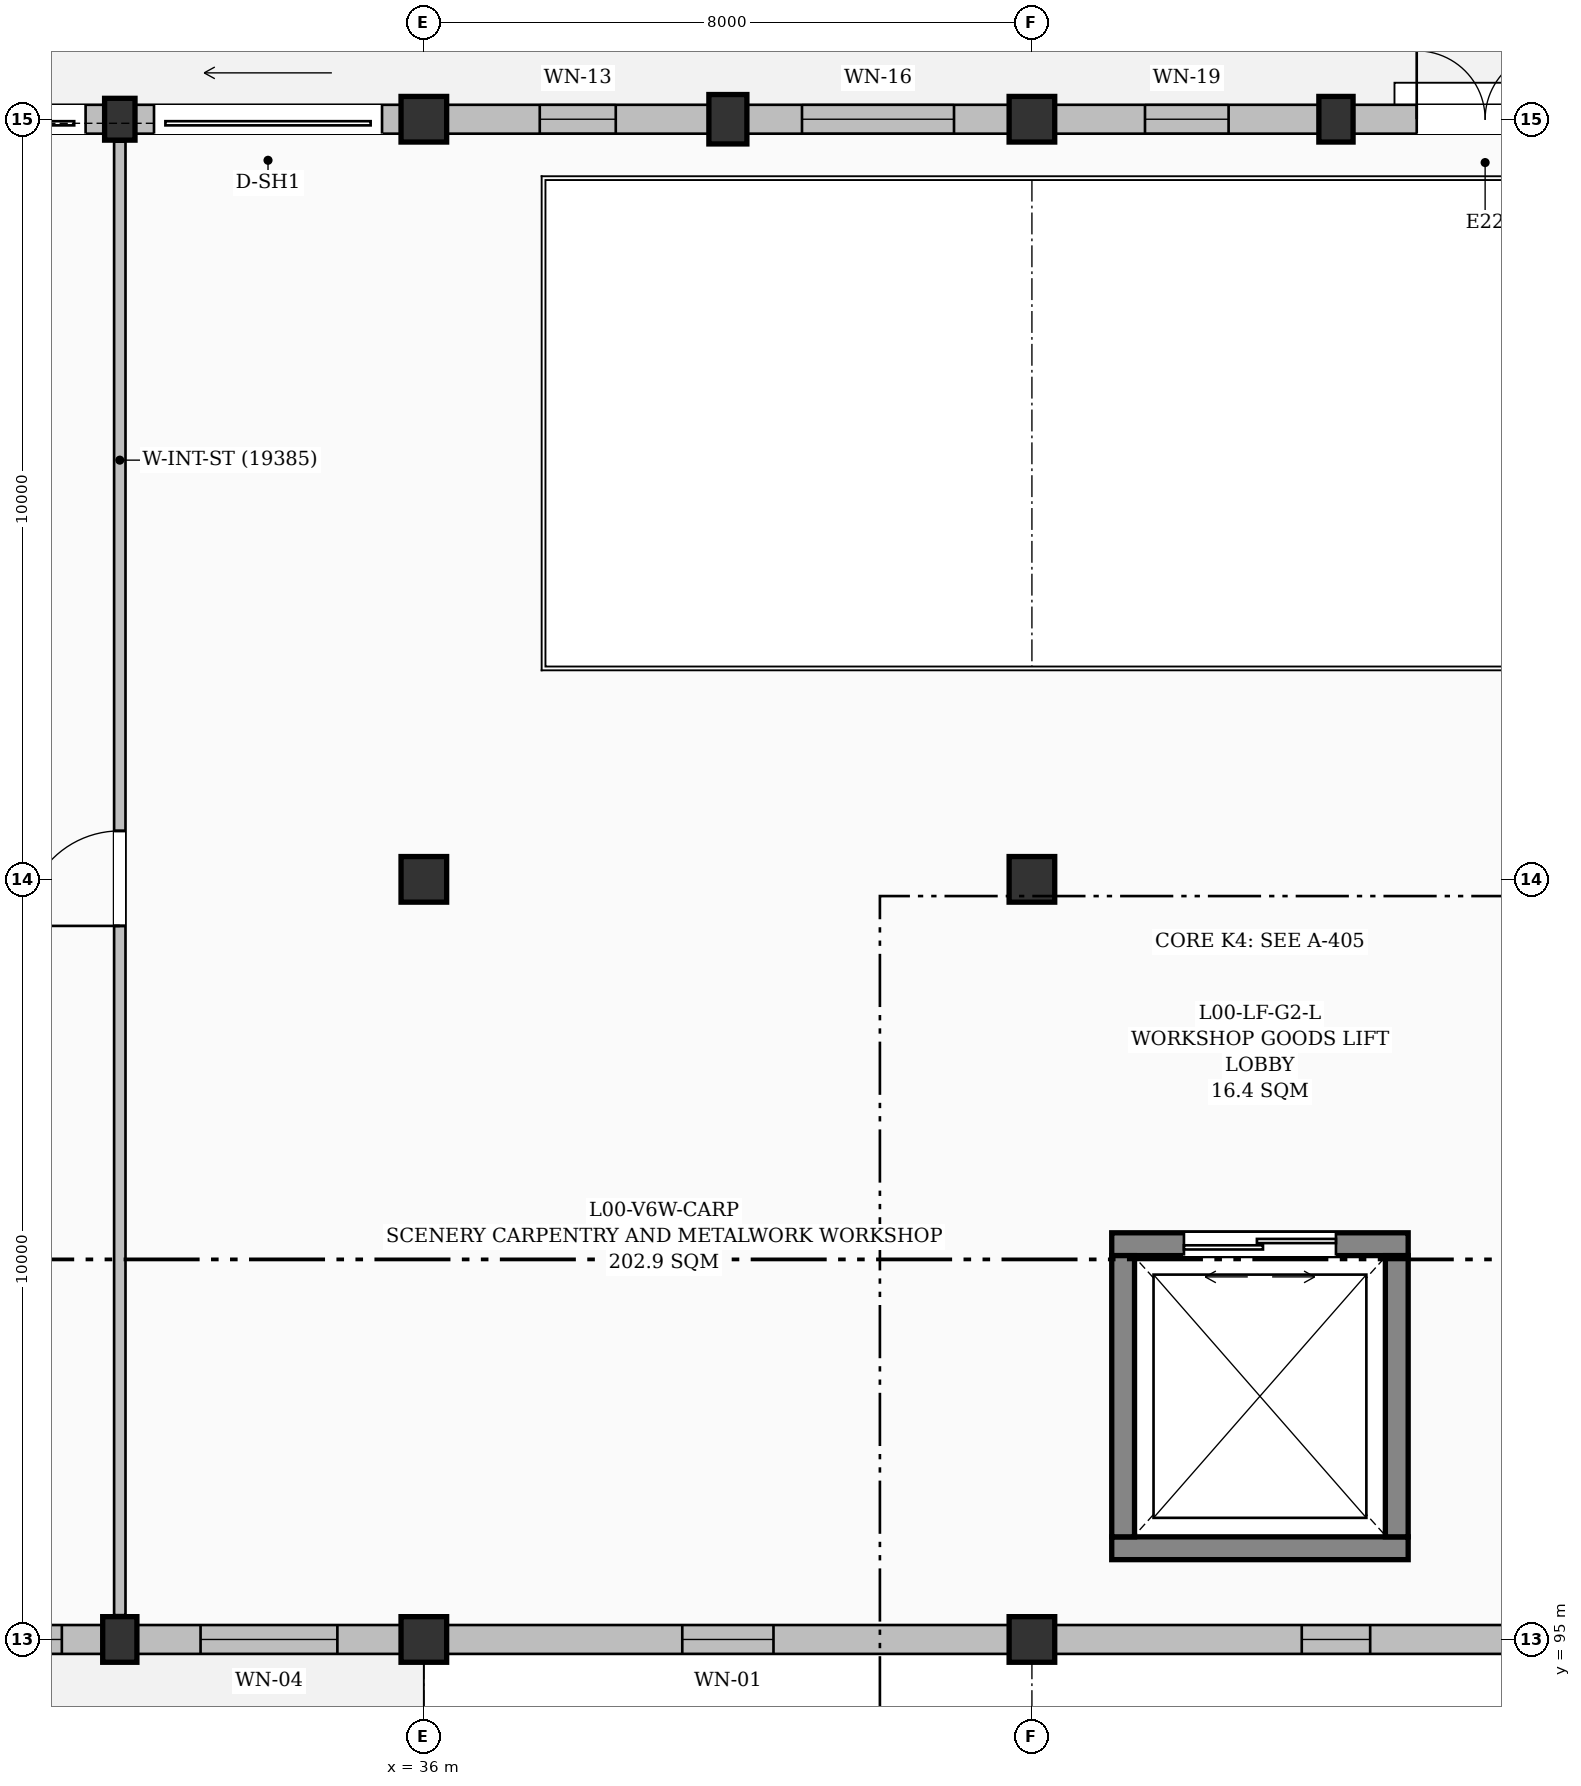
"""IFC4 building model, lengths in metres.
Left out: names, types, materials, properties, quantities, classifications, styles, units other than length and angle.
Written with IfcOpenShell. Run it as: python <this file> out.ifc"""

import sys

from ifc_helpers import new_model, si_unit, direction, frame, frame_2d, origin, origin_2d, place, context, subcontext, project, spatial, rectangle, extrude, element, fill, save


model = new_model("IFC4")
c1 = context("Model", 3, precision=1e-05, world=origin(), true_north=direction((0.0, 1.0)))
c2 = subcontext(c1, "Body", "Model", "MODEL_VIEW")
j1 = project(units=[si_unit("LENGTHUNIT", "METRE"), si_unit("PLANEANGLEUNIT", "RADIAN")], contexts=[c1])
p1 = place(None, origin())
s1 = spatial("IfcSite", under=j1, at=p1, CompositionType="ELEMENT")
p2 = place(p1, origin())
s2 = spatial("IfcBuilding", under=s1, at=p2, CompositionType="ELEMENT")
p3 = place(p2, origin())
s3 = spatial("IfcBuildingStorey", under=s2, at=p3, CompositionType="ELEMENT", Elevation=0.0)
p4 = place(p3, frame((32.0, 95.0, 0.0), z_axis=(0.0, 0.0, 1.0), x_axis=(1.0, 0.0, 0.0)))
e1 = element("IfcColumn", 1, at=p4, inside=s3, PredefinedType="PILASTER", context=c2, shape_type="SweptSolid", body=[
    extrude(rectangle(XDim=0.45, YDim=0.6, at=origin_2d()), origin(), (0.0, 0.0, 1.0), 4.8),
])
p5 = place(p3, frame((32.0, 115.0, 0.0), z_axis=(0.0, 0.0, 1.0), x_axis=(1.0, 0.0, 0.0)))
e2 = element("IfcColumn", 2, at=p5, inside=s3, PredefinedType="PILASTER", context=c2, shape_type="SweptSolid", body=[
    extrude(rectangle(XDim=0.4, YDim=0.55, at=origin_2d()), origin(), (0.0, 0.0, 1.0), 4.8),
])
for number, where, z_axis, x_axis in (
    (3, (36.0, 95.0, 0.0), (0.0, 0.0, 1.0), (1.0, 0.0, 0.0)),
    (4, (36.0, 105.0, 0.0), (0.0, 0.0, 1.0), (1.0, 0.0, 0.0)),
    (5, (36.0, 115.0, 0.0), (0.0, 0.0, 1.0), (1.0, 0.0, 0.0)),
):
    element("IfcColumn", number, at=place(p3, frame(where, z_axis=z_axis, x_axis=x_axis)), inside=s3, PredefinedType="COLUMN", context=c2, shape_type="SweptSolid", body=[
        extrude(rectangle(XDim=0.6, YDim=0.6, at=origin_2d()), origin(), (0.0, 0.0, 1.0), 4.8),
    ])
p6 = place(p3, frame((40.0, 115.0, 0.0), z_axis=(0.0, 0.0, 1.0), x_axis=(1.0, 0.0, 0.0)))
e6 = element("IfcColumn", 6, at=p6, inside=s3, PredefinedType="PILASTER", context=c2, shape_type="SweptSolid", body=[
    extrude(rectangle(XDim=0.5, YDim=0.65, at=origin_2d()), origin(), (0.0, 0.0, 1.0), 4.8),
])
for number, where, z_axis, x_axis in (
    (7, (44.0, 95.0, 0.0), (0.0, 0.0, 1.0), (1.0, 0.0, 0.0)),
    (8, (44.0, 105.0, 0.0), (0.0, 0.0, 1.0), (1.0, 0.0, 0.0)),
    (9, (44.0, 115.0, 0.0), (0.0, 0.0, 1.0), (1.0, 0.0, 0.0)),
):
    element("IfcColumn", number, at=place(p3, frame(where, z_axis=z_axis, x_axis=x_axis)), inside=s3, PredefinedType="COLUMN", context=c2, shape_type="SweptSolid", body=[
        extrude(rectangle(XDim=0.6, YDim=0.6, at=origin_2d()), origin(), (0.0, 0.0, 1.0), 4.8),
    ])
p7 = place(p3, frame((48.0, 115.0, 0.0), z_axis=(0.0, 0.0, 1.0), x_axis=(1.0, 0.0, 0.0)))
e10 = element("IfcColumn", 10, at=p7, inside=s3, PredefinedType="PILASTER", context=c2, shape_type="SweptSolid", body=[
    extrude(rectangle(XDim=0.45, YDim=0.6, at=origin_2d()), origin(), (0.0, 0.0, 1.0), 4.8),
])
p8 = place(p3, frame((28.3, 115.0, 0.0), z_axis=(0.0, 0.0, 1.0), x_axis=(1.0, 0.0, 0.0)))
e11 = element("IfcWall", 11, at=p8, inside=s3, PredefinedType="SOLIDWALL", context=c2, shape_type="SweptSolid", body=[
    extrude(rectangle(XDim=3.5, YDim=0.38, at=frame_2d((1.75, 0.0))), origin(), (0.0, 0.0, 1.0), 3.985),
])
p9 = place(p8, frame((0.25, 0.0, 0.0)))
e12 = element("IfcOpeningElement", 12, at=p9, cuts=e11, PredefinedType="OPENING", context=c2, shape_type="SweptSolid", body=[
    extrude(rectangle(XDim=3.0, YDim=3.1, at=frame_2d((1.5, 1.55))), frame((0.0, 0.2, 0.0), z_axis=(0.0, -1.0, 0.0), x_axis=(1.0, 0.0, 0.0)), (0.0, 0.0, 1.0), 0.4),
])
p10 = place(p3, frame((32.2, 115.0, 0.0), z_axis=(0.0, 0.0, 1.0), x_axis=(1.0, 0.0, 0.0)))
e13 = element("IfcWall", 13, at=p10, inside=s3, PredefinedType="SOLIDWALL", context=c2, shape_type="SweptSolid", body=[
    extrude(rectangle(XDim=3.5, YDim=0.38, at=frame_2d((1.75, 0.0))), origin(), (0.0, 0.0, 1.0), 3.985),
])
p11 = place(p10, frame((0.25, 0.0, 0.0)))
e14 = element("IfcOpeningElement", 14, at=p11, cuts=e13, PredefinedType="OPENING", context=c2, shape_type="SweptSolid", body=[
    extrude(rectangle(XDim=3.0, YDim=3.1, at=frame_2d((1.5, 1.55))), frame((0.0, 0.2, 0.0), z_axis=(0.0, -1.0, 0.0), x_axis=(1.0, 0.0, 0.0)), (0.0, 0.0, 1.0), 0.4),
])
p12 = place(p3, frame((36.3, 115.0, 0.0), z_axis=(0.0, 0.0, 1.0), x_axis=(1.0, 0.0, 0.0)))
e15 = element("IfcWall", 15, at=p12, inside=s3, PredefinedType="SOLIDWALL", context=c2, shape_type="SweptSolid", body=[
    extrude(rectangle(XDim=3.45, YDim=0.38, at=frame_2d((1.725, 0.0))), origin(), (0.0, 0.0, 1.0), 3.935),
])
p13 = place(p12, frame((1.225, 0.0, 0.95)))
e16 = element("IfcOpeningElement", 16, at=p13, cuts=e15, PredefinedType="OPENING", context=c2, shape_type="SweptSolid", body=[
    extrude(rectangle(XDim=1.0, YDim=1.4, at=frame_2d((0.5, 0.7))), frame((0.0, 0.2, 0.0), z_axis=(0.0, -1.0, 0.0), x_axis=(1.0, 0.0, 0.0)), (0.0, 0.0, 1.0), 0.4),
])
p14 = place(p3, frame((40.25, 115.0, 0.0), z_axis=(0.0, 0.0, 1.0), x_axis=(1.0, 0.0, 0.0)))
e17 = element("IfcWall", 17, at=p14, inside=s3, PredefinedType="SOLIDWALL", context=c2, shape_type="SweptSolid", body=[
    extrude(rectangle(XDim=3.45, YDim=0.38, at=frame_2d((1.725, 0.0))), origin(), (0.0, 0.0, 1.0), 3.935),
])
p15 = place(p14, frame((0.725, 0.0, 0.95)))
e18 = element("IfcOpeningElement", 18, at=p15, cuts=e17, PredefinedType="OPENING", context=c2, shape_type="SweptSolid", body=[
    extrude(rectangle(XDim=2.0, YDim=1.2, at=frame_2d((1.0, 0.6))), frame((0.0, 0.2, 0.0), z_axis=(0.0, -1.0, 0.0), x_axis=(1.0, 0.0, 0.0)), (0.0, 0.0, 1.0), 0.4),
])
p16 = place(p3, frame((44.3, 115.0, 0.0), z_axis=(0.0, 0.0, 1.0), x_axis=(1.0, 0.0, 0.0)))
e19 = element("IfcWall", 19, at=p16, inside=s3, PredefinedType="SOLIDWALL", context=c2, shape_type="SweptSolid", body=[
    extrude(rectangle(XDim=3.475, YDim=0.38, at=frame_2d((1.737, 0.0))), origin(), (0.0, 0.0, 1.0), 4.235),
])
p17 = place(p16, frame((1.188, 0.0, 0.95)))
e20 = element("IfcOpeningElement", 20, at=p17, cuts=e19, PredefinedType="OPENING", context=c2, shape_type="SweptSolid", body=[
    extrude(rectangle(XDim=1.1, YDim=2.0, at=frame_2d((0.55, 1.0))), frame((0.0, 0.2, 0.0), z_axis=(0.0, -1.0, 0.0), x_axis=(1.0, 0.0, 0.0)), (0.0, 0.0, 1.0), 0.4),
])
p18 = place(p3, frame((48.225, 115.0, 0.0), z_axis=(0.0, 0.0, 1.0), x_axis=(1.0, 0.0, 0.0)))
e21 = element("IfcWall", 21, at=p18, inside=s3, PredefinedType="SOLIDWALL", context=c2, shape_type="SweptSolid", body=[
    extrude(rectangle(XDim=3.475, YDim=0.38, at=frame_2d((1.737, 0.0))), origin(), (0.0, 0.0, 1.0), 4.235),
])
p19 = place(p18, frame((0.837, 0.0, 0.0)))
e22 = element("IfcOpeningElement", 22, at=p19, cuts=e21, PredefinedType="OPENING", context=c2, shape_type="SweptSolid", body=[
    extrude(rectangle(XDim=1.8, YDim=2.25, at=frame_2d((0.9, 1.125))), frame((0.0, 0.2, 0.0), z_axis=(0.0, -1.0, 0.0), x_axis=(1.0, 0.0, 0.0)), (0.0, 0.0, 1.0), 0.4),
])
p20 = place(p3, frame((51.7, 95.0, 0.0), z_axis=(0.0, 0.0, 1.0), x_axis=(-1.0, 0.0, 0.0)))
e23 = element("IfcWall", 23, at=p20, inside=s3, PredefinedType="SOLIDWALL", context=c2, shape_type="SweptSolid", body=[
    extrude(rectangle(XDim=7.4, YDim=0.38, at=frame_2d((3.7, 0.0))), origin(), (0.0, 0.0, 1.0), 3.985),
])
p21 = place(p20, frame((3.25, 0.0, 0.95)))
e24 = element("IfcOpeningElement", 24, at=p21, cuts=e23, PredefinedType="OPENING", context=c2, shape_type="SweptSolid", body=[
    extrude(rectangle(XDim=0.9, YDim=1.8, at=frame_2d((0.45, 0.9))), frame((0.0, 0.2, 0.0), z_axis=(0.0, -1.0, 0.0), x_axis=(1.0, 0.0, 0.0)), (0.0, 0.0, 1.0), 0.4),
])
p22 = place(p3, frame((43.7, 95.0, 0.0), z_axis=(0.0, 0.0, 1.0), x_axis=(-1.0, 0.0, 0.0)))
e25 = element("IfcWall", 25, at=p22, inside=s3, PredefinedType="SOLIDWALL", context=c2, shape_type="SweptSolid", body=[
    extrude(rectangle(XDim=7.4, YDim=0.38, at=frame_2d((3.7, 0.0))), origin(), (0.0, 0.0, 1.0), 4.035),
])
p23 = place(p22, frame((3.1, 0.0, 0.95)))
e26 = element("IfcOpeningElement", 26, at=p23, cuts=e25, PredefinedType="OPENING", context=c2, shape_type="SweptSolid", body=[
    extrude(rectangle(XDim=1.2, YDim=1.8, at=frame_2d((0.6, 0.9))), frame((0.0, 0.2, 0.0), z_axis=(0.0, -1.0, 0.0), x_axis=(1.0, 0.0, 0.0)), (0.0, 0.0, 1.0), 0.4),
])
p24 = place(p3, frame((35.7, 95.0, 0.0), z_axis=(0.0, 0.0, 1.0), x_axis=(-1.0, 0.0, 0.0)))
e27 = element("IfcWall", 27, at=p24, inside=s3, PredefinedType="SOLIDWALL", context=c2, shape_type="SweptSolid", body=[
    extrude(rectangle(XDim=3.475, YDim=0.38, at=frame_2d((1.737, 0.0))), origin(), (0.0, 0.0, 1.0), 4.235),
])
p25 = place(p24, frame((0.837, 0.0, 0.95)))
e28 = element("IfcOpeningElement", 28, at=p25, cuts=e27, PredefinedType="OPENING", context=c2, shape_type="SweptSolid", body=[
    extrude(rectangle(XDim=1.8, YDim=1.8, at=frame_2d((0.9, 0.9))), frame((0.0, 0.2, 0.0), z_axis=(0.0, -1.0, 0.0), x_axis=(1.0, 0.0, 0.0)), (0.0, 0.0, 1.0), 0.4),
])
p26 = place(p3, frame((31.775, 95.0, 0.0), z_axis=(0.0, 0.0, 1.0), x_axis=(-1.0, 0.0, 0.0)))
e29 = element("IfcWall", 29, at=p26, inside=s3, PredefinedType="SOLIDWALL", context=c2, shape_type="SweptSolid", body=[
    extrude(rectangle(XDim=3.475, YDim=0.38, at=frame_2d((1.737, 0.0))), origin(), (0.0, 0.0, 1.0), 4.235),
])
p27 = place(p26, frame((0.538, 0.0, 0.95)))
e30 = element("IfcOpeningElement", 30, at=p27, cuts=e29, PredefinedType="OPENING", context=c2, shape_type="SweptSolid", body=[
    extrude(rectangle(XDim=2.4, YDim=1.8, at=frame_2d((1.2, 0.9))), frame((0.0, 0.2, 0.0), z_axis=(0.0, -1.0, 0.0), x_axis=(1.0, 0.0, 0.0)), (0.0, 0.0, 1.0), 0.4),
])
p28 = place(p3, frame((45.05, 96.2, 0.0), z_axis=(0.0, 0.0, 1.0), x_axis=(1.0, 0.0, 0.0)))
e31 = element("IfcWall", 31, at=p28, inside=s3, PredefinedType="SHEAR", context=c2, shape_type="SweptSolid", body=[
    extrude(rectangle(XDim=3.9, YDim=0.3, at=frame_2d((1.95, 0.0))), origin(), (0.0, 0.0, 1.0), 4.55),
])
p29 = place(p3, frame((48.95, 100.2, 0.0), z_axis=(0.0, 0.0, 1.0), x_axis=(-1.0, 0.0, 0.0)))
e32 = element("IfcWall", 32, at=p29, inside=s3, PredefinedType="SHEAR", context=c2, shape_type="SweptSolid", body=[
    extrude(rectangle(XDim=3.9, YDim=0.3, at=frame_2d((1.95, 0.0))), origin(), (0.0, 0.0, 1.0), 4.55),
])
p30 = place(p29, frame((0.95, 0.0, 0.0)))
e33 = element("IfcOpeningElement", 33, at=p30, cuts=e32, PredefinedType="OPENING", context=c2, shape_type="SweptSolid", body=[
    extrude(rectangle(XDim=2.0, YDim=2.4, at=frame_2d((1.0, 1.2))), frame((0.0, 0.16, 0.0), z_axis=(0.0, -1.0, 0.0), x_axis=(1.0, 0.0, 0.0)), (0.0, 0.0, 1.0), 0.32),
])
for number, where, z_axis, x_axis in (
    (34, (45.2, 96.35, 0.0), (0.0, 0.0, 1.0), (0.0, 1.0, 0.0)),
    (35, (48.8, 100.05, 0.0), (0.0, 0.0, 1.0), (0.0, -1.0, 0.0)),
):
    element("IfcWall", number, at=place(p3, frame(where, z_axis=z_axis, x_axis=x_axis)), inside=s3, PredefinedType="SHEAR", context=c2, shape_type="SweptSolid", body=[
        extrude(rectangle(XDim=3.7, YDim=0.3, at=frame_2d((1.85, 0.0))), origin(), (0.0, 0.0, 1.0), 4.55),
    ])
p31 = place(p3, frame((32.0, 95.32, 0.0), z_axis=(0.0, 0.0, 1.0), x_axis=(0.0, 1.0, 0.0)))
e36 = element("IfcWall", 36, at=p31, inside=s3, PredefinedType="PARTITIONING", context=c2, shape_type="SweptSolid", body=[
    extrude(rectangle(XDim=19.385, YDim=0.15, at=frame_2d((9.692, 0.0))), origin(), (0.0, 0.0, 1.0), 4.55),
])
p32 = place(p31, frame((9.067, 0.0, 0.0)))
e37 = element("IfcOpeningElement", 37, at=p32, cuts=e36, PredefinedType="OPENING", context=c2, shape_type="SweptSolid", body=[
    extrude(rectangle(XDim=1.25, YDim=2.15, at=frame_2d((0.625, 1.075))), frame((0.0, 0.085, 0.0), z_axis=(0.0, -1.0, 0.0), x_axis=(1.0, 0.0, 0.0)), (0.0, 0.0, 1.0), 0.17),
])
p33 = place(p9, origin())
e38 = element("IfcDoor", 38, at=p33, inside=s3, OperationType="ROLLINGUP", PredefinedType="DOOR", context=c2, shape_type="SweptSolid", body=[
    extrude(rectangle(XDim=3.0, YDim=3.1, at=frame_2d((1.5, 1.55))), frame((0.0, 0.025, 0.0), z_axis=(0.0, -1.0, 0.0), x_axis=(1.0, 0.0, 0.0)), (0.0, 0.0, 1.0), 0.05),
])
fill(e12, e38)
p34 = place(p11, origin())
e39 = element("IfcDoor", 39, at=p34, inside=s3, OperationType="ROLLINGUP", PredefinedType="DOOR", context=c2, shape_type="SweptSolid", body=[
    extrude(rectangle(XDim=3.0, YDim=3.1, at=frame_2d((1.5, 1.55))), frame((0.0, 0.025, 0.0), z_axis=(0.0, -1.0, 0.0), x_axis=(1.0, 0.0, 0.0)), (0.0, 0.0, 1.0), 0.05),
])
fill(e14, e39)
p35 = place(p13, origin())
e40 = element("IfcWindow", 40, at=p35, inside=s3, PartitioningType="SINGLE_PANEL", PredefinedType="WINDOW", context=c2, shape_type="SweptSolid", body=[
    extrude(rectangle(XDim=1.0, YDim=1.4, at=frame_2d((0.5, 0.7))), frame((0.0, 0.03, 0.0), z_axis=(0.0, -1.0, 0.0), x_axis=(1.0, 0.0, 0.0)), (0.0, 0.0, 1.0), 0.06),
])
fill(e16, e40)
p36 = place(p15, origin())
e41 = element("IfcWindow", 41, at=p36, inside=s3, PartitioningType="DOUBLE_PANEL_HORIZONTAL", PredefinedType="WINDOW", context=c2, shape_type="SweptSolid", body=[
    extrude(rectangle(XDim=2.0, YDim=1.2, at=frame_2d((1.0, 0.6))), frame((0.0, 0.03, 0.0), z_axis=(0.0, -1.0, 0.0), x_axis=(1.0, 0.0, 0.0)), (0.0, 0.0, 1.0), 0.06),
])
fill(e18, e41)
p37 = place(p17, origin())
e42 = element("IfcWindow", 42, at=p37, inside=s3, PartitioningType="SINGLE_PANEL", PredefinedType="WINDOW", context=c2, shape_type="SweptSolid", body=[
    extrude(rectangle(XDim=1.1, YDim=2.0, at=frame_2d((0.55, 1.0))), frame((0.0, 0.03, 0.0), z_axis=(0.0, -1.0, 0.0), x_axis=(1.0, 0.0, 0.0)), (0.0, 0.0, 1.0), 0.06),
])
fill(e20, e42)
p38 = place(p19, origin())
e43 = element("IfcDoor", 43, at=p38, inside=s3, OperationType="DOUBLE_DOOR_SINGLE_SWING", PredefinedType="DOOR", context=c2, shape_type="SweptSolid", body=[
    extrude(rectangle(XDim=1.8, YDim=2.25, at=frame_2d((0.9, 1.125))), frame((0.0, 0.025, 0.0), z_axis=(0.0, -1.0, 0.0), x_axis=(1.0, 0.0, 0.0)), (0.0, 0.0, 1.0), 0.05),
])
fill(e22, e43)
p39 = place(p21, origin())
e44 = element("IfcWindow", 44, at=p39, inside=s3, PartitioningType="SINGLE_PANEL", PredefinedType="WINDOW", context=c2, shape_type="SweptSolid", body=[
    extrude(rectangle(XDim=0.9, YDim=1.8, at=frame_2d((0.45, 0.9))), frame((0.0, 0.03, 0.0), z_axis=(0.0, -1.0, 0.0), x_axis=(1.0, 0.0, 0.0)), (0.0, 0.0, 1.0), 0.06),
])
fill(e24, e44)
p40 = place(p23, origin())
e45 = element("IfcWindow", 45, at=p40, inside=s3, PartitioningType="SINGLE_PANEL", PredefinedType="WINDOW", context=c2, shape_type="SweptSolid", body=[
    extrude(rectangle(XDim=1.2, YDim=1.8, at=frame_2d((0.6, 0.9))), frame((0.0, 0.03, 0.0), z_axis=(0.0, -1.0, 0.0), x_axis=(1.0, 0.0, 0.0)), (0.0, 0.0, 1.0), 0.06),
])
fill(e26, e45)
p41 = place(p25, origin())
e46 = element("IfcWindow", 46, at=p41, inside=s3, PartitioningType="DOUBLE_PANEL_VERTICAL", PredefinedType="WINDOW", context=c2, shape_type="SweptSolid", body=[
    extrude(rectangle(XDim=1.8, YDim=1.8, at=frame_2d((0.9, 0.9))), frame((0.0, 0.03, 0.0), z_axis=(0.0, -1.0, 0.0), x_axis=(1.0, 0.0, 0.0)), (0.0, 0.0, 1.0), 0.06),
])
fill(e28, e46)
p42 = place(p27, origin())
e47 = element("IfcWindow", 47, at=p42, inside=s3, PartitioningType="TRIPLE_PANEL_VERTICAL", PredefinedType="WINDOW", context=c2, shape_type="SweptSolid", body=[
    extrude(rectangle(XDim=2.4, YDim=1.8, at=frame_2d((1.2, 0.9))), frame((0.0, 0.03, 0.0), z_axis=(0.0, -1.0, 0.0), x_axis=(1.0, 0.0, 0.0)), (0.0, 0.0, 1.0), 0.06),
])
fill(e30, e47)
p43 = place(p30, origin())
e48 = element("IfcDoor", 48, at=p43, inside=s3, OperationType="DOUBLE_DOOR_SLIDING", PredefinedType="DOOR", context=c2, shape_type="SweptSolid", body=[
    extrude(rectangle(XDim=2.0, YDim=2.4, at=frame_2d((1.0, 1.2))), frame((0.0, 0.025, 0.0), z_axis=(0.0, -1.0, 0.0), x_axis=(1.0, 0.0, 0.0)), (0.0, 0.0, 1.0), 0.05),
])
fill(e33, e48)
p44 = place(p32, origin())
e49 = element("IfcDoor", 49, at=p44, inside=s3, OperationType="SINGLE_SWING_LEFT", PredefinedType="DOOR", context=c2, shape_type="SweptSolid", body=[
    extrude(rectangle(XDim=1.25, YDim=2.15, at=frame_2d((0.625, 1.075))), frame((0.0, 0.025, 0.0), z_axis=(0.0, -1.0, 0.0), x_axis=(1.0, 0.0, 0.0)), (0.0, 0.0, 1.0), 0.05),
])
fill(e37, e49)
save(model, sys.argv[1])
